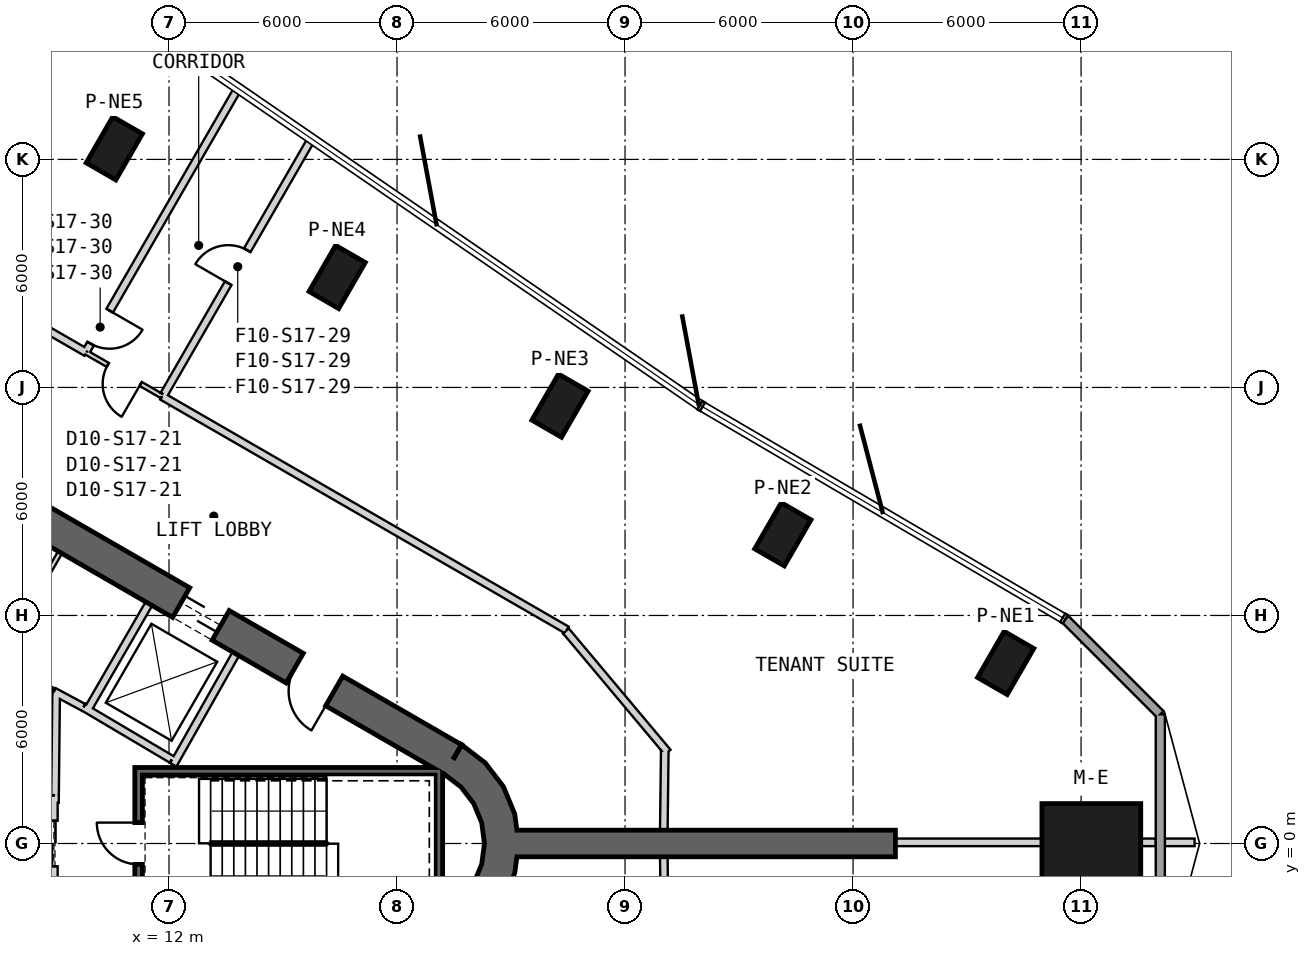
"""IFC4 building model, lengths in metres.
Left out: names, types, materials, properties, quantities, classifications, styles, units other than length and angle.
Written with IfcOpenShell. Run it as: python <this file> out.ifc"""

import sys

from ifc_helpers import new_model, si_unit, direction, frame, frame_2d, origin, origin_2d, place, context, subcontext, project, spatial, polyline, rectangle, outline, extrude, element, fill, save


model = new_model("IFC4")
c1 = context("Model", 3, precision=1e-05, world=origin(), true_north=direction((0.0, 1.0)))
c2 = subcontext(c1, "Body", "Model", "MODEL_VIEW")
j1 = project(units=[si_unit("LENGTHUNIT", "METRE"), si_unit("PLANEANGLEUNIT", "RADIAN")], contexts=[c1])
p1 = place(None, origin())
s1 = spatial("IfcSite", under=j1, at=p1, CompositionType="ELEMENT")
p2 = place(p1, origin())
s2 = spatial("IfcBuilding", under=s1, at=p2, CompositionType="ELEMENT")
p3 = place(p2, frame((0.0, 0.0, 265.2)))
s3 = spatial("IfcBuildingStorey", under=s2, at=p3, CompositionType="ELEMENT", Elevation=265.2)
p4 = place(p3, frame((36.27, 0.0, 0.0), z_axis=(0.0, 0.0, 1.0), x_axis=(1.0, 0.0, 0.0)))
e1 = element("IfcColumn", 1, at=p4, inside=s3, PredefinedType="COLUMN", context=c2, shape_type="SweptSolid", body=[
    extrude(rectangle(XDim=2.6, YDim=2.1, at=origin_2d()), origin(), (0.0, 0.0, 1.0), 4.0),
])
for number, where, z_axis, x_axis in (
    (2, (34.016, 4.75, 0.0), (0.0, 0.0, 1.0), (0.5, 0.866, 0.0)),
    (3, (28.152, 8.135, 0.0), (0.0, 0.0, 1.0), (0.5, 0.866, 0.0)),
    (4, (22.288, 11.521, 0.0), (0.0, 0.0, 1.0), (0.5, 0.866, 0.0)),
    (5, (16.425, 14.906, 0.0), (0.0, 0.0, 1.0), (0.5, 0.866, 0.0)),
    (6, (10.561, 18.292, 0.0), (0.0, 0.0, 1.0), (0.5, 0.866, 0.0)),
):
    element("IfcColumn", number, at=place(p3, frame(where, z_axis=z_axis, x_axis=x_axis)), inside=s3, PredefinedType="COLUMN", context=c2, shape_type="SweptSolid", body=[
        extrude(rectangle(XDim=1.4, YDim=0.9, at=origin_2d()), origin(), (0.0, 0.0, 1.0), 4.0),
    ])
p5 = place(p3, frame((19.475, 2.208, 0.0), z_axis=(0.0, 0.0, 1.0), x_axis=(-0.866028369851, 0.499994862586, 0.0)))
e7 = element("IfcWall", 7, at=p5, inside=s3, PredefinedType="SHEAR", context=c2, shape_type="SweptSolid", body=[
    extrude(rectangle(XDim=31.523, YDim=0.9, at=frame_2d((15.762, 0.0))), origin(), (0.0, 0.0, 1.0), 4.0),
])
p6 = place(p5, frame((7.062, 0.0, 0.0)))
e8 = element("IfcOpeningElement", 8, at=p6, cuts=e7, PredefinedType="OPENING", context=c2, shape_type="SweptSolid", body=[
    extrude(rectangle(XDim=1.2, YDim=2.4, at=frame_2d((0.6, 1.2))), frame((0.0, 0.46, 0.0), z_axis=(0.0, -1.0, 0.0), x_axis=(1.0, 0.0, 0.0)), (0.0, 0.0, 1.0), 0.92),
])
p7 = place(p5, frame((3.612, 0.0, 0.0)))
e9 = element("IfcOpeningElement", 9, at=p7, cuts=e7, PredefinedType="OPENING", context=c2, shape_type="SweptSolid", body=[
    extrude(rectangle(XDim=1.2, YDim=2.4, at=frame_2d((0.6, 1.2))), frame((0.0, 0.46, 0.0), z_axis=(0.0, -1.0, 0.0), x_axis=(1.0, 0.0, 0.0)), (0.0, 0.0, 1.0), 0.92),
])
p8 = place(p5, frame((26.712, 0.0, 0.0)))
e10 = element("IfcOpeningElement", 10, at=p8, cuts=e7, PredefinedType="OPENING", context=c2, shape_type="SweptSolid", body=[
    extrude(rectangle(XDim=1.2, YDim=2.4, at=frame_2d((0.6, 1.2))), frame((0.0, 0.46, 0.0), z_axis=(0.0, -1.0, 0.0), x_axis=(1.0, 0.0, 0.0)), (0.0, 0.0, 1.0), 0.92),
])
p9 = place(p3, origin())
e11 = element("IfcWall", 11, at=p9, inside=s3, PredefinedType="SHEAR", context=c2, shape_type="SweptSolid", body=[
    extrude(outline(polyline([(19.7, -2.598), (20.321, -2.121), (20.798, -1.5), (21.098, -0.777), (21.2, 0.0), (21.098, 0.777), (20.798, 1.5), (20.321, 2.121), (19.7, 2.598), (19.25, 1.819), (19.685, 1.485), (20.019, 1.05), (20.229, 0.543), (20.3, 0.0), (20.229, -0.543), (20.019, -1.05), (19.685, -1.485), (19.25, -1.819), (19.7, -2.598)])), origin(), (0.0, 0.0, 1.0), 4.0),
])
p10 = place(p3, frame((21.15, 0.0, 0.0), z_axis=(0.0, 0.0, 1.0), x_axis=(1.0, 0.0, 0.0)))
e12 = element("IfcWall", 12, at=p10, inside=s3, PredefinedType="SHEAR", context=c2, shape_type="SweptSolid", body=[
    extrude(rectangle(XDim=9.965, YDim=0.7, at=frame_2d((4.982, 0.0))), origin(), (0.0, 0.0, 1.0), 4.0),
])
p11 = place(p3, frame((38.085, -3.399, 0.0), z_axis=(0.0, 0.0, 1.0), x_axis=(0.0, 1.0, 0.0)))
e13 = element("IfcWall", 13, at=p11, inside=s3, PredefinedType="SOLIDWALL", context=c2, shape_type="SweptSolid", body=[
    extrude(rectangle(XDim=6.798, YDim=0.24, at=frame_2d((3.399, 0.0))), origin(), (0.0, 0.0, 1.0), 3.7),
])
p12 = place(p3, frame((38.085, 3.399, 0.0), z_axis=(0.0, 0.0, 1.0), x_axis=(-0.707106781187, 0.707106781187, 0.0)))
e14 = element("IfcWall", 14, at=p12, inside=s3, PredefinedType="SOLIDWALL", context=c2, shape_type="SweptSolid", body=[
    extrude(rectangle(XDim=3.536, YDim=0.24, at=frame_2d((1.768, 0.0))), origin(), (0.0, 0.0, 1.0), 3.7),
])
p13 = place(p3, frame((9.847, 3.495, 0.0), z_axis=(0.0, 0.0, 1.0), x_axis=(0.499984717929, 0.866034226713, 0.0)))
e15 = element("IfcWall", 15, at=p13, inside=s3, PredefinedType="PLUMBINGWALL", context=c2, shape_type="SweptSolid", body=[
    extrude(rectangle(XDim=3.25, YDim=0.2, at=frame_2d((1.625, 0.0))), origin(), (0.0, 0.0, 1.0), 3.7),
])
p14 = place(p3, frame((12.11, 2.073, 0.0), z_axis=(0.0, 0.0, 1.0), x_axis=(0.49196600604, 0.870614408852, 0.0)))
e16 = element("IfcWall", 16, at=p14, inside=s3, PredefinedType="PLUMBINGWALL", context=c2, shape_type="SweptSolid", body=[
    extrude(rectangle(XDim=3.35, YDim=0.2, at=frame_2d((1.675, 0.0))), origin(), (0.0, 0.0, 1.0), 3.7),
])
p15 = place(p3, frame((12.073, 2.211, 0.0), z_axis=(0.0, 0.0, 1.0), x_axis=(-0.860414880418, 0.509594185166, 0.0)))
e17 = element("IfcWall", 17, at=p15, inside=s3, PredefinedType="PLUMBINGWALL", context=c2, shape_type="SweptSolid", body=[
    extrude(rectangle(XDim=2.7, YDim=0.2, at=frame_2d((1.35, 0.0))), origin(), (0.0, 0.0, 1.0), 3.7),
])
p16 = place(p3, frame((19.2, 1.9, -0.3), z_axis=(0.0, 0.0, 1.0), x_axis=(-1.0, 0.0, 0.0)))
e18 = element("IfcWall", 18, at=p16, inside=s3, PredefinedType="SHEAR", context=c2, shape_type="SweptSolid", body=[
    extrude(rectangle(XDim=8.1, YDim=0.2, at=frame_2d((4.05, 0.0))), origin(), (0.0, 0.0, 1.0), 4.0),
])
p17 = place(p3, frame((19.1, -2.0, -0.3), z_axis=(0.0, 0.0, 1.0), x_axis=(0.0, 1.0, 0.0)))
e19 = element("IfcWall", 19, at=p17, inside=s3, PredefinedType="SHEAR", context=c2, shape_type="SweptSolid", body=[
    extrude(rectangle(XDim=3.8, YDim=0.2, at=frame_2d((1.9, 0.0))), origin(), (0.0, 0.0, 1.0), 4.0),
])
p18 = place(p3, frame((11.2, -1.8, -0.3), z_axis=(0.0, 0.0, 1.0), x_axis=(0.0, 1.0, 0.0)))
e20 = element("IfcWall", 20, at=p18, inside=s3, PredefinedType="SHEAR", context=c2, shape_type="SweptSolid", body=[
    extrude(rectangle(XDim=3.6, YDim=0.2, at=frame_2d((1.8, 0.0))), origin(), (0.0, 0.0, 1.0), 4.0),
])
p19 = place(p18, frame((1.25, 0.0, 0.3)))
e21 = element("IfcOpeningElement", 21, at=p19, cuts=e20, PredefinedType="OPENING", context=c2, shape_type="SweptSolid", body=[
    extrude(rectangle(XDim=1.1, YDim=2.1, at=frame_2d((0.55, 1.05))), frame((0.0, 0.11, 0.0), z_axis=(0.0, -1.0, 0.0), x_axis=(1.0, 0.0, 0.0)), (0.0, 0.0, 1.0), 0.22),
])
p20 = place(p3, frame((8.97, 1.2, 0.0), z_axis=(0.0, 0.0, 1.0), x_axis=(0.0, -1.0, 0.0)))
e22 = element("IfcWall", 22, at=p20, inside=s3, PredefinedType="PLUMBINGWALL", context=c2, shape_type="SweptSolid", body=[
    extrude(rectangle(XDim=2.4, YDim=0.2, at=frame_2d((1.2, 0.0))), origin(), (0.0, 0.0, 1.0), 3.7),
])
p21 = place(p20, frame((0.6, 0.0, 0.0)))
e23 = element("IfcOpeningElement", 23, at=p21, cuts=e22, PredefinedType="OPENING", context=c2, shape_type="SweptSolid", body=[
    extrude(rectangle(XDim=1.2, YDim=2.4, at=frame_2d((0.6, 1.2))), frame((0.0, 0.11, 0.0), z_axis=(0.0, -1.0, 0.0), x_axis=(1.0, 0.0, 0.0)), (0.0, 0.0, 1.0), 0.22),
])
p22 = place(p3, frame((6.0, 1.2, 0.0), z_axis=(0.0, 0.0, 1.0), x_axis=(0.999949988, -0.010001074852, 0.0)))
e24 = element("IfcWall", 24, at=p22, inside=s3, PredefinedType="PLUMBINGWALL", context=c2, shape_type="SweptSolid", body=[
    extrude(rectangle(XDim=3.1, YDim=0.2, at=frame_2d((1.55, 0.0))), origin(), (0.0, 0.0, 1.0), 3.7),
])
p23 = place(p3, frame((7.508, 4.845, 0.0), z_axis=(0.0, 0.0, 1.0), x_axis=(0.500017246033, 0.866015446554, 0.0)))
e25 = element("IfcWall", 25, at=p23, inside=s3, PredefinedType="PARTITIONING", context=c2, shape_type="SweptSolid", body=[
    extrude(rectangle(XDim=3.25, YDim=0.12, at=frame_2d((1.625, 0.0))), origin(), (0.0, 0.0, 1.0), 3.7),
])
p24 = place(p23, frame((1.225, 0.0, 0.0)))
e26 = element("IfcOpeningElement", 26, at=p24, cuts=e25, PredefinedType="OPENING", context=c2, shape_type="SweptSolid", body=[
    extrude(rectangle(XDim=0.8, YDim=2.1, at=frame_2d((0.4, 1.05))), frame((0.0, 0.07, 0.0), z_axis=(0.0, -1.0, 0.0), x_axis=(1.0, 0.0, 0.0)), (0.0, 0.0, 1.0), 0.14),
])
p25 = place(p3, frame((8.974, 3.999, 0.0), z_axis=(0.0, 0.0, 1.0), x_axis=(0.880917147855, -0.473270513147, 0.0)))
e27 = element("IfcWall", 27, at=p25, inside=s3, PredefinedType="PARTITIONING", context=c2, shape_type="SweptSolid", body=[
    extrude(rectangle(XDim=0.878, YDim=0.2, at=frame_2d((0.439, 0.0))), origin(), (0.0, 0.0, 1.0), 3.7),
])
p26 = place(p3, frame((8.931, 4.026, 0.0), z_axis=(0.0, 0.0, 1.0), x_axis=(-0.857531586833, 0.514431314738, 0.0)))
e28 = element("IfcWall", 28, at=p26, inside=s3, PredefinedType="PLUMBINGWALL", context=c2, shape_type="SweptSolid", body=[
    extrude(rectangle(XDim=1.671, YDim=0.15, at=frame_2d((0.836, 0.0))), origin(), (0.0, 0.0, 1.0), 3.7),
])
p27 = place(p3, frame((9.001, 1.27, 0.0), z_axis=(0.0, 0.0, 1.0), x_axis=(0.010751103362, 0.999942205218, 0.0)))
e29 = element("IfcWall", 29, at=p27, inside=s3, PredefinedType="PARTITIONING", context=c2, shape_type="SweptSolid", body=[
    extrude(rectangle(XDim=2.725, YDim=0.2, at=frame_2d((1.363, 0.0))), origin(), (0.0, 0.0, 1.0), 3.7),
])
p28 = place(p3, frame((11.817, 11.768, 0.0), z_axis=(0.0, 0.0, 1.0), x_axis=(-0.86602648383, 0.499998129301, 0.0)))
e30 = element("IfcWall", 30, at=p28, inside=s3, PredefinedType="PARTITIONING", context=c2, shape_type="SweptSolid", body=[
    extrude(rectangle(XDim=2.3, YDim=0.12, at=frame_2d((1.15, 0.0))), origin(), (0.0, 0.0, 1.0), 3.7),
])
p29 = place(p28, frame((0.65, 0.0, 0.0)))
e31 = element("IfcOpeningElement", 31, at=p29, cuts=e30, PredefinedType="OPENING", context=c2, shape_type="SweptSolid", body=[
    extrude(rectangle(XDim=1.0, YDim=2.1, at=frame_2d((0.5, 1.05))), frame((0.0, 0.07, 0.0), z_axis=(0.0, -1.0, 0.0), x_axis=(1.0, 0.0, 0.0)), (0.0, 0.0, 1.0), 0.14),
])
p30 = place(p3, frame((22.466, 5.62, 0.0), z_axis=(0.0, 0.0, 1.0), x_axis=(-0.866024234898, 0.500002024564, 0.0)))
e32 = element("IfcWall", 32, at=p30, inside=s3, PredefinedType="PARTITIONING", context=c2, shape_type="SweptSolid", body=[
    extrude(rectangle(XDim=12.296, YDim=0.2, at=frame_2d((6.148, 0.0))), origin(), (0.0, 0.0, 1.0), 2.98),
])
p31 = place(p3, frame((9.825, 12.918, 0.0), z_axis=(0.0, 0.0, 1.0), x_axis=(-0.866022708987, 0.500004667497, 0.0)))
e33 = element("IfcWall", 33, at=p31, inside=s3, PredefinedType="PARTITIONING", context=c2, shape_type="SweptSolid", body=[
    extrude(rectangle(XDim=18.496, YDim=0.2, at=frame_2d((9.248, 0.0))), origin(), (0.0, 0.0, 1.0), 2.98),
])
p32 = place(p3, frame((25.121, 2.403, 0.0), z_axis=(0.0, 0.0, 1.0), x_axis=(-0.642809831665, 0.766025796116, 0.0)))
e34 = element("IfcWall", 34, at=p32, inside=s3, PredefinedType="PARTITIONING", context=c2, shape_type="SweptSolid", body=[
    extrude(rectangle(XDim=4.165, YDim=0.2, at=frame_2d((2.083, 0.0))), origin(), (0.0, 0.0, 1.0), 2.88),
])
p33 = place(p3, frame((25.021, 0.35, 0.0), z_axis=(0.0, 0.0, 1.0), x_axis=(0.012014998271, 0.999927817303, 0.0)))
e35 = element("IfcWall", 35, at=p33, inside=s3, PredefinedType="PARTITIONING", context=c2, shape_type="SweptSolid", body=[
    extrude(rectangle(XDim=2.093, YDim=0.2, at=frame_2d((1.046, 0.0))), origin(), (0.0, 0.0, 1.0), 3.7),
])
p34 = place(p3, frame((25.048, -2.608, 0.0), z_axis=(0.0, 0.0, 1.0), x_axis=(-0.012000433251, 0.999927992208, 0.0)))
e36 = element("IfcWall", 36, at=p34, inside=s3, PredefinedType="PARTITIONING", context=c2, shape_type="SweptSolid", body=[
    extrude(rectangle(XDim=2.258, YDim=0.2, at=frame_2d((1.129, 0.0))), origin(), (0.0, 0.0, 1.0), 3.7),
])
p35 = place(p3, frame((11.865, 11.81, 0.0), z_axis=(0.0, 0.0, 1.0), x_axis=(0.500025956197, 0.866010417449, 0.0)))
e37 = element("IfcWall", 37, at=p35, inside=s3, PredefinedType="PARTITIONING", context=c2, shape_type="SweptSolid", body=[
    extrude(rectangle(XDim=7.775, YDim=0.2, at=frame_2d((3.888, 0.0))), origin(), (0.0, 0.0, 1.0), 3.7),
])
p36 = place(p35, frame((3.388, 0.0, 0.0)))
e38 = element("IfcOpeningElement", 38, at=p36, cuts=e37, PredefinedType="OPENING", context=c2, shape_type="SweptSolid", body=[
    extrude(rectangle(XDim=1.0, YDim=2.1, at=frame_2d((0.5, 1.05))), frame((0.0, 0.11, 0.0), z_axis=(0.0, -1.0, 0.0), x_axis=(1.0, 0.0, 0.0)), (0.0, 0.0, 1.0), 0.22),
])
p37 = place(p3, frame((13.817, 19.872, 0.0), z_axis=(0.0, 0.0, 1.0), x_axis=(-0.499989797406, -0.866031294175, 0.0)))
e39 = element("IfcWall", 39, at=p37, inside=s3, PredefinedType="PARTITIONING", context=c2, shape_type="SweptSolid", body=[
    extrude(rectangle(XDim=7.958, YDim=0.2, at=frame_2d((3.979, 0.0))), origin(), (0.0, 0.0, 1.0), 3.7),
])
p38 = place(p37, frame((6.758, 0.0, 0.0)))
e40 = element("IfcOpeningElement", 40, at=p38, cuts=e39, PredefinedType="OPENING", context=c2, shape_type="SweptSolid", body=[
    extrude(rectangle(XDim=1.0, YDim=2.1, at=frame_2d((0.5, 1.05))), frame((0.0, 0.11, 0.0), z_axis=(0.0, -1.0, 0.0), x_axis=(1.0, 0.0, 0.0)), (0.0, 0.0, 1.0), 0.22),
])
p39 = place(p3, frame((38.988, 0.03, 0.0), z_axis=(0.0, 0.0, 1.0), x_axis=(-1.0, 0.0, 0.0)))
e41 = element("IfcWall", 41, at=p39, inside=s3, PredefinedType="PARTITIONING", context=c2, shape_type="SweptSolid", body=[
    extrude(rectangle(XDim=0.783, YDim=0.2, at=frame_2d((0.392, 0.0))), origin(), (0.0, 0.0, 1.0), 3.7),
])
p40 = place(p3, frame((37.965, 0.03, 0.0), z_axis=(0.0, 0.0, 1.0), x_axis=(-1.0, 0.0, 0.0)))
e42 = element("IfcWall", 42, at=p40, inside=s3, PredefinedType="PARTITIONING", context=c2, shape_type="SweptSolid", body=[
    extrude(rectangle(XDim=0.395, YDim=0.2, at=frame_2d((0.197, 0.0))), origin(), (0.0, 0.0, 1.0), 3.7),
])
p41 = place(p3, frame((34.97, 0.03, 0.0), z_axis=(0.0, 0.0, 1.0), x_axis=(-1.0, 0.0, 0.0)))
e43 = element("IfcWall", 43, at=p41, inside=s3, PredefinedType="PARTITIONING", context=c2, shape_type="SweptSolid", body=[
    extrude(rectangle(XDim=3.856, YDim=0.2, at=frame_2d((1.928, 0.0))), origin(), (0.0, 0.0, 1.0), 3.27),
])
p42 = place(p19, origin())
e44 = element("IfcDoor", 44, at=p42, inside=s3, OperationType="SINGLE_SWING_RIGHT", PredefinedType="USERDEFINED", context=c2, shape_type="SweptSolid", body=[
    extrude(rectangle(XDim=1.1, YDim=2.1, at=frame_2d((0.55, 1.05))), frame((0.0, 0.025, 0.0), z_axis=(0.0, -1.0, 0.0), x_axis=(1.0, 0.0, 0.0)), (0.0, 0.0, 1.0), 0.05),
])
fill(e21, e44)
p43 = place(p21, origin())
e45 = element("IfcDoor", 45, at=p43, inside=s3, OperationType="SLIDING_TO_LEFT", PredefinedType="USERDEFINED", context=c2, shape_type="SweptSolid", body=[
    extrude(rectangle(XDim=1.2, YDim=2.4, at=frame_2d((0.6, 1.2))), frame((0.0, 0.025, 0.0), z_axis=(0.0, -1.0, 0.0), x_axis=(1.0, 0.0, 0.0)), (0.0, 0.0, 1.0), 0.05),
])
fill(e23, e45)
p44 = place(p29, origin())
e46 = element("IfcDoor", 46, at=p44, inside=s3, OperationType="SINGLE_SWING_RIGHT", PredefinedType="NOTDEFINED", context=c2, shape_type="SweptSolid", body=[
    extrude(rectangle(XDim=1.0, YDim=2.1, at=frame_2d((0.5, 1.05))), frame((0.0, 0.025, 0.0), z_axis=(0.0, -1.0, 0.0), x_axis=(1.0, 0.0, 0.0)), (0.0, 0.0, 1.0), 0.05),
])
fill(e31, e46)
p45 = place(p36, origin())
e47 = element("IfcDoor", 47, at=p45, inside=s3, OperationType="SINGLE_SWING_LEFT", PredefinedType="USERDEFINED", context=c2, shape_type="SweptSolid", body=[
    extrude(rectangle(XDim=1.0, YDim=2.1, at=frame_2d((0.5, 1.05))), frame((0.0, 0.025, 0.0), z_axis=(0.0, -1.0, 0.0), x_axis=(1.0, 0.0, 0.0)), (0.0, 0.0, 1.0), 0.05),
])
fill(e38, e47)
p46 = place(p38, origin())
e48 = element("IfcDoor", 48, at=p46, inside=s3, OperationType="SINGLE_SWING_RIGHT", PredefinedType="USERDEFINED", context=c2, shape_type="SweptSolid", body=[
    extrude(rectangle(XDim=1.0, YDim=2.1, at=frame_2d((0.5, 1.05))), frame((0.0, 0.025, 0.0), z_axis=(0.0, -1.0, 0.0), x_axis=(1.0, 0.0, 0.0)), (0.0, 0.0, 1.0), 0.05),
])
fill(e40, e48)
p47 = place(p6, origin())
e49 = element("IfcDoor", 49, at=p47, inside=s3, OperationType="SLIDING_TO_LEFT", PredefinedType="USERDEFINED", context=c2, shape_type="SweptSolid", body=[
    extrude(rectangle(XDim=1.2, YDim=2.4, at=frame_2d((0.6, 1.2))), frame((0.0, 0.025, 0.0), z_axis=(0.0, -1.0, 0.0), x_axis=(1.0, 0.0, 0.0)), (0.0, 0.0, 1.0), 0.05),
])
fill(e8, e49)
p48 = place(p7, origin())
e50 = element("IfcDoor", 50, at=p48, inside=s3, OperationType="SINGLE_SWING_LEFT", PredefinedType="USERDEFINED", context=c2, shape_type="SweptSolid", body=[
    extrude(rectangle(XDim=1.2, YDim=2.4, at=frame_2d((0.6, 1.2))), frame((0.0, 0.025, 0.0), z_axis=(0.0, -1.0, 0.0), x_axis=(1.0, 0.0, 0.0)), (0.0, 0.0, 1.0), 0.05),
])
fill(e9, e50)
save(model, sys.argv[1])
